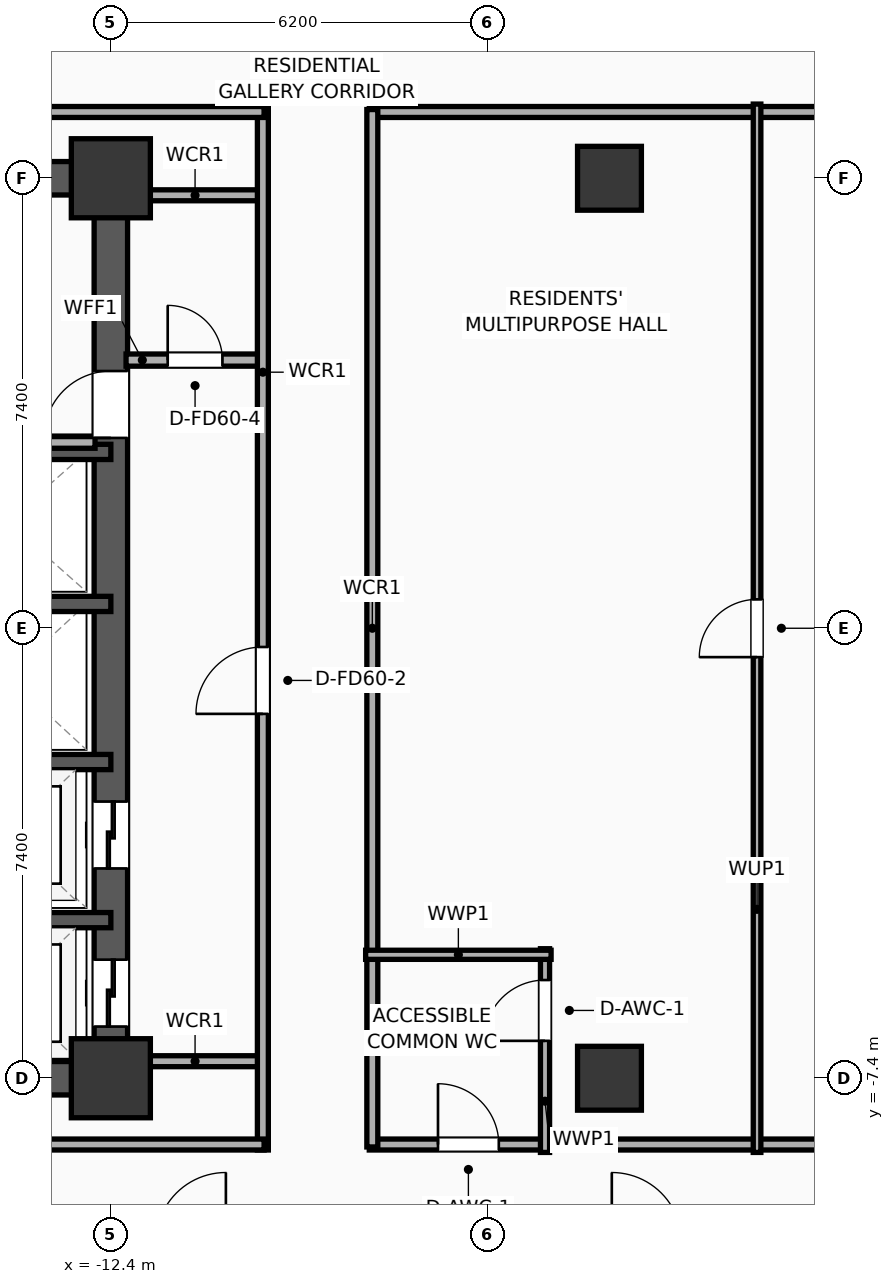
"""IFC4 building model, lengths in metres.
Left out: names, types, materials, properties, quantities, classifications, styles, units other than length and angle.
Written with IfcOpenShell. Run it as: python <this file> out.ifc"""

import sys

from ifc_helpers import new_model, si_unit, direction, frame, frame_2d, origin, origin_2d, place, context, subcontext, project, spatial, rectangle, extrude, element, fill, save


model = new_model("IFC4")
c1 = context("Model", 3, precision=1e-05, world=origin(), true_north=direction((0.0, 1.0)))
c2 = subcontext(c1, "Body", "Model", "MODEL_VIEW")
j1 = project(units=[si_unit("LENGTHUNIT", "METRE"), si_unit("PLANEANGLEUNIT", "RADIAN")], contexts=[c1])
p1 = place(None, origin())
s1 = spatial("IfcSite", under=j1, at=p1, CompositionType="ELEMENT")
p2 = place(p1, origin())
s2 = spatial("IfcBuilding", under=s1, at=p2, CompositionType="ELEMENT")
p3 = place(p2, frame((0.0, 0.0, 136.5)))
s3 = spatial("IfcBuildingStorey", under=s2, at=p3, CompositionType="ELEMENT", Elevation=136.5)
for number, where, z_axis, x_axis in (
    (1, (-12.4, -7.4, 0.0), (0.0, 0.0, 1.0), (1.0, 0.0, 0.0)),
    (2, (-12.4, 7.4, 0.0), (0.0, 0.0, 1.0), (1.0, 0.0, 0.0)),
):
    element("IfcColumn", number, at=place(p3, frame(where, z_axis=z_axis, x_axis=x_axis)), inside=s3, PredefinedType="COLUMN", context=c2, shape_type="SweptSolid", body=[
        extrude(rectangle(XDim=1.3, YDim=1.3, at=origin_2d()), origin(), (0.0, 0.0, 1.0), 3.9),
    ])
for number, where, z_axis, x_axis in (
    (3, (-19.475, -7.4, 0.0), (0.0, 0.0, 1.0), (1.0, 0.0, 0.0)),
    (4, (-19.475, 7.4, 0.0), (0.0, 0.0, 1.0), (1.0, 0.0, 0.0)),
):
    element("IfcWall", number, at=place(p3, frame(where, z_axis=z_axis, x_axis=x_axis)), inside=s3, PredefinedType="SHEAR", context=c2, shape_type="SweptSolid", body=[
        extrude(rectangle(XDim=7.35, YDim=0.55, at=frame_2d((3.675, 0.0))), origin(), (0.0, 0.0, 1.0), 3.5),
    ])
p4 = place(p3, frame((-12.4, -7.4, 0.0), z_axis=(0.0, 0.0, 1.0), x_axis=(0.0, 1.0, 0.0)))
e5 = element("IfcWall", 5, at=p4, inside=s3, PredefinedType="SHEAR", context=c2, shape_type="SweptSolid", body=[
    extrude(rectangle(XDim=14.8, YDim=0.55, at=frame_2d((7.4, 0.0))), origin(), (0.0, 0.0, 1.0), 3.5),
])
p5 = place(p4, frame((0.85, 0.0, 0.0)))
e6 = element("IfcOpeningElement", 6, at=p5, cuts=e5, PredefinedType="OPENING", context=c2, shape_type="SweptSolid", body=[
    extrude(rectangle(XDim=1.1, YDim=2.05, at=frame_2d((0.55, 1.025))), frame((0.0, 0.285, 0.0), z_axis=(0.0, -1.0, 0.0), x_axis=(1.0, 0.0, 0.0)), (0.0, 0.0, 1.0), 0.57),
])
p6 = place(p4, frame((3.45, 0.0, 0.0)))
e7 = element("IfcOpeningElement", 7, at=p6, cuts=e5, PredefinedType="OPENING", context=c2, shape_type="SweptSolid", body=[
    extrude(rectangle(XDim=1.1, YDim=2.05, at=frame_2d((0.55, 1.025))), frame((0.0, 0.285, 0.0), z_axis=(0.0, -1.0, 0.0), x_axis=(1.0, 0.0, 0.0)), (0.0, 0.0, 1.0), 0.57),
])
p7 = place(p4, frame((10.53, 0.0, 0.0)))
e8 = element("IfcOpeningElement", 8, at=p7, cuts=e5, PredefinedType="OPENING", context=c2, shape_type="SweptSolid", body=[
    extrude(rectangle(XDim=1.1, YDim=2.05, at=frame_2d((0.55, 1.025))), frame((0.0, 0.285, 0.0), z_axis=(0.0, -1.0, 0.0), x_axis=(1.0, 0.0, 0.0)), (0.0, 0.0, 1.0), 0.57),
])
for number, where, z_axis, x_axis in (
    (9, (-4.2, -7.4, 0.0), (0.0, 0.0, 1.0), (1.0, 0.0, 0.0)),
    (10, (-4.2, 7.4, 0.0), (0.0, 0.0, 1.0), (1.0, 0.0, 0.0)),
):
    element("IfcColumn", number, at=place(p3, frame(where, z_axis=z_axis, x_axis=x_axis)), inside=s3, PredefinedType="COLUMN", context=c2, shape_type="SweptSolid", body=[
        extrude(rectangle(XDim=1.05, YDim=1.05, at=origin_2d()), origin(), (0.0, 0.0, 1.0), 3.9),
    ])
for number, where, z_axis, x_axis in (
    (11, (-12.4, -4.8, 0.0), (0.0, 0.0, 1.0), (-1.0, 0.0, 0.0)),
    (12, (-12.4, -2.2, 0.0), (0.0, 0.0, 1.0), (-1.0, 0.0, 0.0)),
    (13, (-12.4, 0.4, 0.0), (0.0, 0.0, 1.0), (-1.0, 0.0, 0.0)),
    (14, (-12.4, 2.9, 0.0), (0.0, 0.0, 1.0), (-1.0, 0.0, 0.0)),
):
    element("IfcWall", number, at=place(p3, frame(where, z_axis=z_axis, x_axis=x_axis)), inside=s3, PredefinedType="SOLIDWALL", context=c2, shape_type="SweptSolid", body=[
        extrude(rectangle(XDim=3.0, YDim=0.25, at=frame_2d((1.5, 0.0))), origin(), (0.0, 0.0, 1.0), 3.5),
    ])
p8 = place(p3, frame((-15.82, 3.06, 0.0), z_axis=(0.0, 0.0, 1.0), x_axis=(1.0, 0.0, 0.0)))
e15 = element("IfcWall", 15, at=p8, inside=s3, PredefinedType="PARTITIONING", context=c2, shape_type="SweptSolid", body=[
    extrude(rectangle(XDim=3.16, YDim=0.2, at=frame_2d((1.58, 0.0))), origin(), (0.0, 0.0, 1.0), 3.5),
])
p9 = place(p3, frame((-12.15, 4.41, 0.0), z_axis=(0.0, 0.0, 1.0), x_axis=(1.0, 0.0, 0.0)))
e16 = element("IfcWall", 16, at=p9, inside=s3, PredefinedType="PARTITIONING", context=c2, shape_type="SweptSolid", body=[
    extrude(rectangle(XDim=2.27, YDim=0.2, at=frame_2d((1.135, 0.0))), origin(), (0.0, 0.0, 1.0), 3.5),
])
p10 = place(p9, frame((0.685, 0.0, 0.0)))
e17 = element("IfcOpeningElement", 17, at=p10, cuts=e16, PredefinedType="OPENING", context=c2, shape_type="SweptSolid", body=[
    extrude(rectangle(XDim=0.9, YDim=2.05, at=frame_2d((0.45, 1.025))), frame((0.0, 0.11, 0.0), z_axis=(0.0, -1.0, 0.0), x_axis=(1.0, 0.0, 0.0)), (0.0, 0.0, 1.0), 0.22),
])
for number, where, z_axis, x_axis in (
    (18, (-12.15, 7.12, 0.0), (0.0, 0.0, 1.0), (1.0, 0.0, 0.0)),
    (19, (-12.15, -7.12, 0.0), (0.0, 0.0, 1.0), (1.0, 0.0, 0.0)),
):
    element("IfcWall", number, at=place(p3, frame(where, z_axis=z_axis, x_axis=x_axis)), inside=s3, PredefinedType="PARTITIONING", context=c2, shape_type="SweptSolid", body=[
        extrude(rectangle(XDim=2.27, YDim=0.18, at=frame_2d((1.135, 0.0))), origin(), (0.0, 0.0, 1.0), 2.54),
    ])
p11 = place(p3, frame((-9.9, -8.58, 0.0), z_axis=(0.0, 0.0, 1.0), x_axis=(0.0, 1.0, 0.0)))
e20 = element("IfcWall", 20, at=p11, inside=s3, PredefinedType="PARTITIONING", context=c2, shape_type="SweptSolid", body=[
    extrude(rectangle(XDim=17.16, YDim=0.18, at=frame_2d((8.58, 0.0))), origin(), (0.0, 0.0, 1.0), 3.5),
])
p12 = place(p11, frame((7.172, 0.0, 0.0)))
e21 = element("IfcOpeningElement", 21, at=p12, cuts=e20, PredefinedType="OPENING", context=c2, shape_type="SweptSolid", body=[
    extrude(rectangle(XDim=1.1, YDim=2.05, at=frame_2d((0.55, 1.025))), frame((0.0, 0.1, 0.0), z_axis=(0.0, -1.0, 0.0), x_axis=(1.0, 0.0, 0.0)), (0.0, 0.0, 1.0), 0.2),
])
p13 = place(p3, frame((-29.21, 8.49, 0.0), z_axis=(0.0, 0.0, 1.0), x_axis=(1.0, 0.0, 0.0)))
e22 = element("IfcWall", 22, at=p13, inside=s3, PredefinedType="PARTITIONING", context=c2, shape_type="SweptSolid", body=[
    extrude(rectangle(XDim=19.33, YDim=0.18, at=frame_2d((9.665, 0.0))), origin(), (0.0, 0.0, 1.0), 2.39),
])
p14 = place(p13, frame((2.44, 0.0, 0.0)))
e23 = element("IfcOpeningElement", 23, at=p14, cuts=e22, PredefinedType="OPENING", context=c2, shape_type="SweptSolid", body=[
    extrude(rectangle(XDim=1.15, YDim=2.05, at=frame_2d((0.575, 1.025))), frame((0.0, 0.1, 0.0), z_axis=(0.0, -1.0, 0.0), x_axis=(1.0, 0.0, 0.0)), (0.0, 0.0, 1.0), 0.2),
])
p15 = place(p3, frame((-29.21, -8.49, 0.0), z_axis=(0.0, 0.0, 1.0), x_axis=(1.0, 0.0, 0.0)))
e24 = element("IfcWall", 24, at=p15, inside=s3, PredefinedType="PARTITIONING", context=c2, shape_type="SweptSolid", body=[
    extrude(rectangle(XDim=19.33, YDim=0.18, at=frame_2d((9.665, 0.0))), origin(), (0.0, 0.0, 1.0), 2.39),
])
p16 = place(p3, frame((-8.15, 8.49, 0.0), z_axis=(0.0, 0.0, 1.0), x_axis=(1.0, 0.0, 0.0)))
e25 = element("IfcWall", 25, at=p16, inside=s3, PredefinedType="PARTITIONING", context=c2, shape_type="SweptSolid", body=[
    extrude(rectangle(XDim=16.3, YDim=0.18, at=frame_2d((8.15, 0.0))), origin(), (0.0, 0.0, 1.0), 3.5),
])
p17 = place(p16, frame((8.49, 0.0, 0.0)))
e26 = element("IfcOpeningElement", 26, at=p17, cuts=e25, PredefinedType="OPENING", context=c2, shape_type="SweptSolid", body=[
    extrude(rectangle(XDim=0.95, YDim=2.05, at=frame_2d((0.475, 1.025))), frame((0.0, 0.1, 0.0), z_axis=(0.0, -1.0, 0.0), x_axis=(1.0, 0.0, 0.0)), (0.0, 0.0, 1.0), 0.2),
])
p18 = place(p3, frame((-8.15, -8.49, 0.0), z_axis=(0.0, 0.0, 1.0), x_axis=(1.0, 0.0, 0.0)))
e27 = element("IfcWall", 27, at=p18, inside=s3, PredefinedType="PARTITIONING", context=c2, shape_type="SweptSolid", body=[
    extrude(rectangle(XDim=16.3, YDim=0.18, at=frame_2d((8.15, 0.0))), origin(), (0.0, 0.0, 1.0), 3.5),
])
p19 = place(p18, frame((1.13, 0.0, 0.0)))
e28 = element("IfcOpeningElement", 28, at=p19, cuts=e27, PredefinedType="OPENING", context=c2, shape_type="SweptSolid", body=[
    extrude(rectangle(XDim=1.0, YDim=2.05, at=frame_2d((0.5, 1.025))), frame((0.0, 0.1, 0.0), z_axis=(0.0, -1.0, 0.0), x_axis=(1.0, 0.0, 0.0)), (0.0, 0.0, 1.0), 0.2),
])
p20 = place(p18, frame((10.12, 0.0, 0.0)))
e29 = element("IfcOpeningElement", 29, at=p20, cuts=e27, PredefinedType="OPENING", context=c2, shape_type="SweptSolid", body=[
    extrude(rectangle(XDim=0.95, YDim=2.05, at=frame_2d((0.475, 1.025))), frame((0.0, 0.1, 0.0), z_axis=(0.0, -1.0, 0.0), x_axis=(1.0, 0.0, 0.0)), (0.0, 0.0, 1.0), 0.2),
])
p21 = place(p3, frame((-8.1, -8.53, 0.0), z_axis=(0.0, 0.0, 1.0), x_axis=(0.0, 1.0, 0.0)))
e30 = element("IfcWall", 30, at=p21, inside=s3, PredefinedType="PARTITIONING", context=c2, shape_type="SweptSolid", body=[
    extrude(rectangle(XDim=17.06, YDim=0.18, at=frame_2d((8.53, 0.0))), origin(), (0.0, 0.0, 1.0), 3.5),
])
p22 = place(p3, frame((-5.26, -8.62, 0.0), z_axis=(0.0, 0.0, 1.0), x_axis=(0.0, 1.0, 0.0)))
e31 = element("IfcWall", 31, at=p22, inside=s3, PredefinedType="PLUMBINGWALL", context=c2, shape_type="SweptSolid", body=[
    extrude(rectangle(XDim=3.35, YDim=0.15, at=frame_2d((1.675, 0.0))), origin(), (0.0, 0.0, 1.0), 3.5),
])
p23 = place(p22, frame((1.835, 0.0, 0.0)))
e32 = element("IfcOpeningElement", 32, at=p23, cuts=e31, PredefinedType="OPENING", context=c2, shape_type="SweptSolid", body=[
    extrude(rectangle(XDim=1.0, YDim=2.05, at=frame_2d((0.5, 1.025))), frame((0.0, 0.085, 0.0), z_axis=(0.0, -1.0, 0.0), x_axis=(1.0, 0.0, 0.0)), (0.0, 0.0, 1.0), 0.17),
])
p24 = place(p3, frame((-8.21, -5.37, 0.0), z_axis=(0.0, 0.0, 1.0), x_axis=(1.0, 0.0, 0.0)))
e33 = element("IfcWall", 33, at=p24, inside=s3, PredefinedType="PLUMBINGWALL", context=c2, shape_type="SweptSolid", body=[
    extrude(rectangle(XDim=3.05, YDim=0.15, at=frame_2d((1.525, 0.0))), origin(), (0.0, 0.0, 1.0), 3.5),
])
p25 = place(p3, frame((-1.773, -8.62, 0.0), z_axis=(0.0, 0.0, 1.0), x_axis=(0.0, 1.0, 0.0)))
e34 = element("IfcWall", 34, at=p25, inside=s3, PredefinedType="PARTITIONING", context=c2, shape_type="SweptSolid", body=[
    extrude(rectangle(XDim=17.24, YDim=0.125, at=frame_2d((8.62, 0.0))), origin(), (0.0, 0.0, 1.0), 3.5),
])
p26 = place(p25, frame((8.145, 0.0, 0.0)))
e35 = element("IfcOpeningElement", 35, at=p26, cuts=e34, PredefinedType="OPENING", context=c2, shape_type="SweptSolid", body=[
    extrude(rectangle(XDim=0.95, YDim=2.05, at=frame_2d((0.475, 1.025))), frame((0.0, 0.073, 0.0), z_axis=(0.0, -1.0, 0.0), x_axis=(1.0, 0.0, 0.0)), (0.0, 0.0, 1.0), 0.145),
])
p27 = place(p5, origin())
e36 = element("IfcDoor", 36, at=p27, inside=s3, OperationType="SLIDING_TO_LEFT", PredefinedType="DOOR", context=c2, shape_type="SweptSolid", body=[
    extrude(rectangle(XDim=1.1, YDim=2.05, at=frame_2d((0.55, 1.025))), frame((0.0, 0.025, 0.0), z_axis=(0.0, -1.0, 0.0), x_axis=(1.0, 0.0, 0.0)), (0.0, 0.0, 1.0), 0.05),
])
fill(e6, e36)
p28 = place(p6, origin())
e37 = element("IfcDoor", 37, at=p28, inside=s3, OperationType="SLIDING_TO_LEFT", PredefinedType="DOOR", context=c2, shape_type="SweptSolid", body=[
    extrude(rectangle(XDim=1.1, YDim=2.05, at=frame_2d((0.55, 1.025))), frame((0.0, 0.025, 0.0), z_axis=(0.0, -1.0, 0.0), x_axis=(1.0, 0.0, 0.0)), (0.0, 0.0, 1.0), 0.05),
])
fill(e7, e37)
p29 = place(p10, origin())
e38 = element("IfcDoor", 38, at=p29, inside=s3, OperationType="SINGLE_SWING_LEFT", PredefinedType="DOOR", context=c2, shape_type="SweptSolid", body=[
    extrude(rectangle(XDim=0.9, YDim=2.05, at=frame_2d((0.45, 1.025))), frame((0.0, 0.025, 0.0), z_axis=(0.0, -1.0, 0.0), x_axis=(1.0, 0.0, 0.0)), (0.0, 0.0, 1.0), 0.05),
])
fill(e17, e38)
p30 = place(p12, origin())
e39 = element("IfcDoor", 39, at=p30, inside=s3, OperationType="SINGLE_SWING_LEFT", PredefinedType="DOOR", context=c2, shape_type="SweptSolid", body=[
    extrude(rectangle(XDim=1.1, YDim=2.05, at=frame_2d((0.55, 1.025))), frame((0.0, 0.025, 0.0), z_axis=(0.0, -1.0, 0.0), x_axis=(1.0, 0.0, 0.0)), (0.0, 0.0, 1.0), 0.05),
])
fill(e21, e39)
p31 = place(p19, origin())
e40 = element("IfcDoor", 40, at=p31, inside=s3, OperationType="SINGLE_SWING_LEFT", PredefinedType="DOOR", context=c2, shape_type="SweptSolid", body=[
    extrude(rectangle(XDim=1.0, YDim=2.05, at=frame_2d((0.5, 1.025))), frame((0.0, 0.025, 0.0), z_axis=(0.0, -1.0, 0.0), x_axis=(1.0, 0.0, 0.0)), (0.0, 0.0, 1.0), 0.05),
])
fill(e28, e40)
p32 = place(p23, origin())
e41 = element("IfcDoor", 41, at=p32, inside=s3, OperationType="SINGLE_SWING_LEFT", PredefinedType="DOOR", context=c2, shape_type="SweptSolid", body=[
    extrude(rectangle(XDim=1.0, YDim=2.05, at=frame_2d((0.5, 1.025))), frame((0.0, 0.025, 0.0), z_axis=(0.0, -1.0, 0.0), x_axis=(1.0, 0.0, 0.0)), (0.0, 0.0, 1.0), 0.05),
])
fill(e32, e41)
p33 = place(p26, origin())
e42 = element("IfcDoor", 42, at=p33, inside=s3, OperationType="SINGLE_SWING_LEFT", PredefinedType="DOOR", context=c2, shape_type="SweptSolid", body=[
    extrude(rectangle(XDim=0.95, YDim=2.05, at=frame_2d((0.475, 1.025))), frame((0.0, 0.025, 0.0), z_axis=(0.0, -1.0, 0.0), x_axis=(1.0, 0.0, 0.0)), (0.0, 0.0, 1.0), 0.05),
])
fill(e35, e42)
p34 = place(p7, origin())
e43 = element("IfcDoor", 43, at=p34, inside=s3, OperationType="SINGLE_SWING_LEFT", PredefinedType="DOOR", context=c2, shape_type="SweptSolid", body=[
    extrude(rectangle(XDim=1.1, YDim=2.05, at=frame_2d((0.55, 1.025))), frame((0.0, 0.025, 0.0), z_axis=(0.0, -1.0, 0.0), x_axis=(1.0, 0.0, 0.0)), (0.0, 0.0, 1.0), 0.05),
])
fill(e8, e43)
save(model, sys.argv[1])
